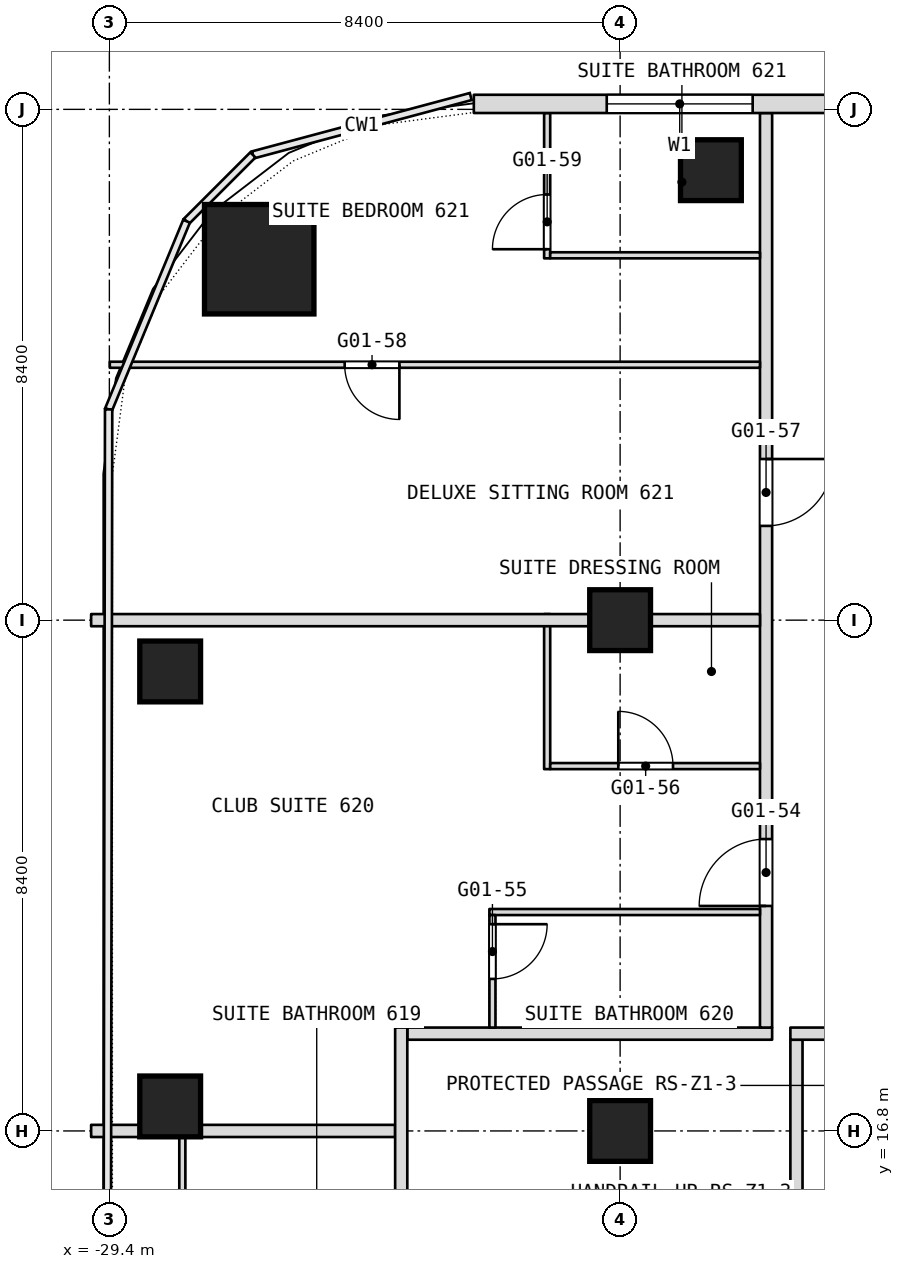
"""IFC4 building model, lengths in metres.
Left out: names, types, materials, properties, quantities, classifications, styles, units other than length and angle.
Written with IfcOpenShell. Run it as: python <this file> out.ifc"""

import sys

from ifc_helpers import new_model, si_unit, direction, frame, frame_2d, origin, origin_2d, place, context, subcontext, project, spatial, rectangle, extrude, element, fill, save


model = new_model("IFC4")
c1 = context("Model", 3, precision=1e-05, world=origin(), true_north=direction((0.0, 1.0)))
c2 = subcontext(c1, "Body", "Model", "MODEL_VIEW")
j1 = project(units=[si_unit("LENGTHUNIT", "METRE"), si_unit("PLANEANGLEUNIT", "RADIAN")], contexts=[c1])
p1 = place(None, origin())
s1 = spatial("IfcSite", under=j1, at=p1, CompositionType="ELEMENT")
p2 = place(p1, origin())
s2 = spatial("IfcBuilding", under=s1, at=p2, CompositionType="ELEMENT")
p3 = place(p2, frame((0.0, 0.0, 36.5)))
s3 = spatial("IfcBuildingStorey", under=s2, at=p3, CompositionType="ELEMENT", Elevation=36.5)
p4 = place(p3, frame((-26.936, 31.135, 0.0), z_axis=(0.0, 0.0, 1.0), x_axis=(1.0, 0.0, 0.0)))
e1 = element("IfcColumn", 1, at=p4, inside=s3, PredefinedType="COLUMN", context=c2, shape_type="SweptSolid", body=[
    extrude(rectangle(XDim=1.8, YDim=1.8, at=origin_2d()), origin(), (0.0, 0.0, 1.0), 3.6),
])
for number, where, z_axis, x_axis in (
    (2, (-21.0, 16.8, 0.0), (0.0, 0.0, 1.0), (1.0, 0.0, 0.0)),
    (3, (-21.0, 25.2, 0.0), (0.0, 0.0, 1.0), (1.0, 0.0, 0.0)),
    (4, (-28.4, 17.203, 0.0), (0.0, 0.0, 1.0), (1.0, 0.0, 0.0)),
    (5, (-28.4, 24.356, 0.0), (0.0, 0.0, 1.0), (1.0, 0.0, 0.0)),
    (6, (-19.507, 32.6, 0.0), (0.0, 0.0, 1.0), (1.0, 0.0, 0.0)),
):
    element("IfcColumn", number, at=place(p3, frame(where, z_axis=z_axis, x_axis=x_axis)), inside=s3, PredefinedType="COLUMN", context=c2, shape_type="SweptSolid", body=[
        extrude(rectangle(XDim=1.0, YDim=1.0, at=origin_2d()), origin(), (0.0, 0.0, 1.0), 3.6),
    ])
p5 = place(p3, frame((-29.7, 16.8, 0.0), z_axis=(0.0, 0.0, 1.0), x_axis=(1.0, 0.0, 0.0)))
e7 = element("IfcWall", 7, at=p5, inside=s3, PredefinedType="PARTITIONING", context=c2, shape_type="SweptSolid", body=[
    extrude(rectangle(XDim=5.0, YDim=0.2, at=frame_2d((2.5, 0.0))), origin(), (0.0, 0.0, 1.0), 2.84),
])
p6 = place(p3, frame((-18.1, 15.8, 0.0), z_axis=(0.0, 0.0, 1.0), x_axis=(0.0, 1.0, 0.0)))
e8 = element("IfcWall", 8, at=p6, inside=s3, PredefinedType="PARTITIONING", context=c2, shape_type="SweptSolid", body=[
    extrude(rectangle(XDim=2.5, YDim=0.2, at=frame_2d((1.25, 0.0))), origin(), (0.0, 0.0, 1.0), 3.34),
])
p7 = place(p3, frame((-24.5, 18.4, 0.0), z_axis=(0.0, 0.0, 1.0), x_axis=(1.0, 0.0, 0.0)))
e9 = element("IfcWall", 9, at=p7, inside=s3, PredefinedType="PARTITIONING", context=c2, shape_type="SweptSolid", body=[
    extrude(rectangle(XDim=6.0, YDim=0.2, at=frame_2d((3.0, 0.0))), origin(), (0.0, 0.0, 1.0), 3.34),
])
p8 = place(p3, frame((-18.2, 18.4, 0.0), z_axis=(0.0, 0.0, 1.0), x_axis=(1.0, 0.0, 0.0)))
e10 = element("IfcWall", 10, at=p8, inside=s3, PredefinedType="PARTITIONING", context=c2, shape_type="SweptSolid", body=[
    extrude(rectangle(XDim=5.0, YDim=0.2, at=frame_2d((2.5, 0.0))), origin(), (0.0, 0.0, 1.0), 3.34),
])
p9 = place(p3, frame((-18.6, 18.5, 0.0), z_axis=(0.0, 0.0, 1.0), x_axis=(0.0, 1.0, 0.0)))
e11 = element("IfcWall", 11, at=p9, inside=s3, PredefinedType="PARTITIONING", context=c2, shape_type="SweptSolid", body=[
    extrude(rectangle(XDim=15.04, YDim=0.2, at=frame_2d((7.52, 0.0))), origin(), (0.0, 0.0, 1.0), 3.34),
])
p10 = place(p9, frame((2.0, 0.0, 0.0)))
e12 = element("IfcOpeningElement", 12, at=p10, cuts=e11, PredefinedType="OPENING", context=c2, shape_type="SweptSolid", body=[
    extrude(rectangle(XDim=1.1, YDim=2.1, at=frame_2d((0.55, 1.05))), frame((0.0, 0.1, 0.0), z_axis=(0.0, -1.0, 0.0), x_axis=(1.0, 0.0, 0.0)), (0.0, 0.0, 1.0), 0.2),
])
p11 = place(p9, frame((8.25, 0.0, 0.0)))
e13 = element("IfcOpeningElement", 13, at=p11, cuts=e11, PredefinedType="OPENING", context=c2, shape_type="SweptSolid", body=[
    extrude(rectangle(XDim=1.1, YDim=2.1, at=frame_2d((0.55, 1.05))), frame((0.0, 0.1, 0.0), z_axis=(0.0, -1.0, 0.0), x_axis=(1.0, 0.0, 0.0)), (0.0, 0.0, 1.0), 0.2),
])
p12 = place(p3, frame((-23.15, 20.4, 0.0), z_axis=(0.0, 0.0, 1.0), x_axis=(1.0, 0.0, 0.0)))
e14 = element("IfcWall", 14, at=p12, inside=s3, PredefinedType="PARTITIONING", context=c2, shape_type="SweptSolid", body=[
    extrude(rectangle(XDim=4.45, YDim=0.1, at=frame_2d((2.225, 0.0))), origin(), (0.0, 0.0, 1.0), 3.34),
])
p13 = place(p3, frame((-22.2, 22.75, 0.0), z_axis=(0.0, 0.0, 1.0), x_axis=(0.0, 1.0, 0.0)))
e15 = element("IfcWall", 15, at=p13, inside=s3, PredefinedType="PARTITIONING", context=c2, shape_type="SweptSolid", body=[
    extrude(rectangle(XDim=2.55, YDim=0.1, at=frame_2d((1.275, 0.0))), origin(), (0.0, 0.0, 1.0), 3.34),
])
p14 = place(p3, frame((-22.2, 31.15, 0.0), z_axis=(0.0, 0.0, 1.0), x_axis=(0.0, 1.0, 0.0)))
e16 = element("IfcWall", 16, at=p14, inside=s3, PredefinedType="PARTITIONING", context=c2, shape_type="SweptSolid", body=[
    extrude(rectangle(XDim=2.39, YDim=0.1, at=frame_2d((1.195, 0.0))), origin(), (0.0, 0.0, 1.0), 3.34),
])
p15 = place(p14, frame((0.15, 0.0, 0.0)))
e17 = element("IfcOpeningElement", 17, at=p15, cuts=e16, PredefinedType="OPENING", context=c2, shape_type="SweptSolid", body=[
    extrude(rectangle(XDim=0.9, YDim=2.1, at=frame_2d((0.45, 1.05))), frame((0.0, 0.05, 0.0), z_axis=(0.0, -1.0, 0.0), x_axis=(1.0, 0.0, 0.0)), (0.0, 0.0, 1.0), 0.1),
])
p16 = place(p3, frame((-22.15, 22.8, 0.0), z_axis=(0.0, 0.0, 1.0), x_axis=(1.0, 0.0, 0.0)))
e18 = element("IfcWall", 18, at=p16, inside=s3, PredefinedType="PARTITIONING", context=c2, shape_type="SweptSolid", body=[
    extrude(rectangle(XDim=3.45, YDim=0.1, at=frame_2d((1.725, 0.0))), origin(), (0.0, 0.0, 1.0), 3.34),
])
p17 = place(p16, frame((1.12, 0.0, 0.0)))
e19 = element("IfcOpeningElement", 19, at=p17, cuts=e18, PredefinedType="OPENING", context=c2, shape_type="SweptSolid", body=[
    extrude(rectangle(XDim=0.9, YDim=2.1, at=frame_2d((0.45, 1.05))), frame((0.0, 0.05, 0.0), z_axis=(0.0, -1.0, 0.0), x_axis=(1.0, 0.0, 0.0)), (0.0, 0.0, 1.0), 0.1),
])
p18 = place(p3, frame((-23.1, 18.5, 0.0), z_axis=(0.0, 0.0, 1.0), x_axis=(0.0, 1.0, 0.0)))
e20 = element("IfcWall", 20, at=p18, inside=s3, PredefinedType="PARTITIONING", context=c2, shape_type="SweptSolid", body=[
    extrude(rectangle(XDim=1.85, YDim=0.1, at=frame_2d((0.925, 0.0))), origin(), (0.0, 0.0, 1.0), 3.34),
])
p19 = place(p18, frame((0.8, 0.0, 0.0)))
e21 = element("IfcOpeningElement", 21, at=p19, cuts=e20, PredefinedType="OPENING", context=c2, shape_type="SweptSolid", body=[
    extrude(rectangle(XDim=0.9, YDim=2.1, at=frame_2d((0.45, 1.05))), frame((0.0, 0.05, 0.0), z_axis=(0.0, -1.0, 0.0), x_axis=(1.0, 0.0, 0.0)), (0.0, 0.0, 1.0), 0.1),
])
p20 = place(p3, frame((-24.6, 6.9, 0.0), z_axis=(0.0, 0.0, 1.0), x_axis=(0.0, 1.0, 0.0)))
e22 = element("IfcWall", 22, at=p20, inside=s3, PredefinedType="PARTITIONING", context=c2, shape_type="SweptSolid", body=[
    extrude(rectangle(XDim=11.6, YDim=0.2, at=frame_2d((5.8, 0.0))), origin(), (0.0, 0.0, 1.0), 3.34),
])
p21 = place(p20, frame((5.1, 0.0, 0.0)))
e23 = element("IfcOpeningElement", 23, at=p21, cuts=e22, PredefinedType="OPENING", context=c2, shape_type="SweptSolid", body=[
    extrude(rectangle(XDim=1.1, YDim=2.1, at=frame_2d((0.55, 1.05))), frame((0.0, 0.1, 0.0), z_axis=(0.0, -1.0, 0.0), x_axis=(1.0, 0.0, 0.0)), (0.0, 0.0, 1.0), 0.2),
])
p22 = place(p3, frame((-29.7, 25.2, 0.0), z_axis=(0.0, 0.0, 1.0), x_axis=(1.0, 0.0, 0.0)))
e24 = element("IfcWall", 24, at=p22, inside=s3, PredefinedType="PARTITIONING", context=c2, shape_type="SweptSolid", body=[
    extrude(rectangle(XDim=11.0, YDim=0.2, at=frame_2d((5.5, 0.0))), origin(), (0.0, 0.0, 1.0), 2.84),
])
p23 = place(p3, frame((-28.2, 13.15, 0.0), z_axis=(0.0, 0.0, 1.0), x_axis=(0.0, 1.0, 0.0)))
e25 = element("IfcWall", 25, at=p23, inside=s3, PredefinedType="PARTITIONING", context=c2, shape_type="SweptSolid", body=[
    extrude(rectangle(XDim=3.75, YDim=0.1, at=frame_2d((1.875, 0.0))), origin(), (0.0, 0.0, 1.0), 2.94),
])
p24 = place(p3, frame((-29.393, 29.4, 0.0), z_axis=(0.0, 0.0, 1.0), x_axis=(1.0, 0.0, 0.0)))
e26 = element("IfcWall", 26, at=p24, inside=s3, PredefinedType="PARTITIONING", context=c2, shape_type="SweptSolid", body=[
    extrude(rectangle(XDim=10.693, YDim=0.1, at=frame_2d((5.347, 0.0))), origin(), (0.0, 0.0, 1.0), 3.34),
])
p25 = place(p24, frame((3.863, 0.0, 0.0)))
e27 = element("IfcOpeningElement", 27, at=p25, cuts=e26, PredefinedType="OPENING", context=c2, shape_type="SweptSolid", body=[
    extrude(rectangle(XDim=0.9, YDim=2.1, at=frame_2d((0.45, 1.05))), frame((0.0, 0.05, 0.0), z_axis=(0.0, -1.0, 0.0), x_axis=(1.0, 0.0, 0.0)), (0.0, 0.0, 1.0), 0.1),
])
p26 = place(p3, frame((-22.15, 31.2, 0.0), z_axis=(0.0, 0.0, 1.0), x_axis=(1.0, 0.0, 0.0)))
e28 = element("IfcWall", 28, at=p26, inside=s3, PredefinedType="PARTITIONING", context=c2, shape_type="SweptSolid", body=[
    extrude(rectangle(XDim=3.45, YDim=0.1, at=frame_2d((1.725, 0.0))), origin(), (0.0, 0.0, 1.0), 3.34),
])
p27 = place(p3, frame((23.406, 33.69, 0.0), z_axis=(0.0, 0.0, 1.0), x_axis=(-1.0, 0.0, 0.0)))
e29 = element("IfcWall", 29, at=p27, inside=s3, PredefinedType="NOTDEFINED", context=c2, shape_type="SweptSolid", body=[
    extrude(rectangle(XDim=46.812, YDim=0.3, at=frame_2d((23.406, 0.0))), origin(), (0.0, 0.0, 1.0), 3.6),
])
p28 = place(p27, frame((2.186, 0.0, 0.9)))
e30 = element("IfcOpeningElement", 30, at=p28, cuts=e29, PredefinedType="OPENING", context=c2, shape_type="SweptSolid", body=[
    extrude(rectangle(XDim=2.4, YDim=2.1, at=frame_2d((1.2, 1.05))), frame((0.0, 0.15, 0.0), z_axis=(0.0, -1.0, 0.0), x_axis=(1.0, 0.0, 0.0)), (0.0, 0.0, 1.0), 0.3),
])
p29 = place(p27, frame((7.506, 0.0, 0.9)))
e31 = element("IfcOpeningElement", 31, at=p29, cuts=e29, PredefinedType="OPENING", context=c2, shape_type="SweptSolid", body=[
    extrude(rectangle(XDim=2.4, YDim=2.1, at=frame_2d((1.2, 1.05))), frame((0.0, 0.15, 0.0), z_axis=(0.0, -1.0, 0.0), x_axis=(1.0, 0.0, 0.0)), (0.0, 0.0, 1.0), 0.3),
])
p30 = place(p27, frame((11.706, 0.0, 0.9)))
e32 = element("IfcOpeningElement", 32, at=p30, cuts=e29, PredefinedType="OPENING", context=c2, shape_type="SweptSolid", body=[
    extrude(rectangle(XDim=2.4, YDim=2.1, at=frame_2d((1.2, 1.05))), frame((0.0, 0.15, 0.0), z_axis=(0.0, -1.0, 0.0), x_axis=(1.0, 0.0, 0.0)), (0.0, 0.0, 1.0), 0.3),
])
p31 = place(p27, frame((15.906, 0.0, 0.9)))
e33 = element("IfcOpeningElement", 33, at=p31, cuts=e29, PredefinedType="OPENING", context=c2, shape_type="SweptSolid", body=[
    extrude(rectangle(XDim=2.4, YDim=2.1, at=frame_2d((1.2, 1.05))), frame((0.0, 0.15, 0.0), z_axis=(0.0, -1.0, 0.0), x_axis=(1.0, 0.0, 0.0)), (0.0, 0.0, 1.0), 0.3),
])
p32 = place(p27, frame((20.106, 0.0, 0.9)))
e34 = element("IfcOpeningElement", 34, at=p32, cuts=e29, PredefinedType="OPENING", context=c2, shape_type="SweptSolid", body=[
    extrude(rectangle(XDim=2.4, YDim=2.1, at=frame_2d((1.2, 1.05))), frame((0.0, 0.15, 0.0), z_axis=(0.0, -1.0, 0.0), x_axis=(1.0, 0.0, 0.0)), (0.0, 0.0, 1.0), 0.3),
])
p33 = place(p27, frame((24.306, 0.0, 0.9)))
e35 = element("IfcOpeningElement", 35, at=p33, cuts=e29, PredefinedType="OPENING", context=c2, shape_type="SweptSolid", body=[
    extrude(rectangle(XDim=2.4, YDim=2.1, at=frame_2d((1.2, 1.05))), frame((0.0, 0.15, 0.0), z_axis=(0.0, -1.0, 0.0), x_axis=(1.0, 0.0, 0.0)), (0.0, 0.0, 1.0), 0.3),
])
p34 = place(p27, frame((28.506, 0.0, 0.9)))
e36 = element("IfcOpeningElement", 36, at=p34, cuts=e29, PredefinedType="OPENING", context=c2, shape_type="SweptSolid", body=[
    extrude(rectangle(XDim=2.4, YDim=2.1, at=frame_2d((1.2, 1.05))), frame((0.0, 0.15, 0.0), z_axis=(0.0, -1.0, 0.0), x_axis=(1.0, 0.0, 0.0)), (0.0, 0.0, 1.0), 0.3),
])
p35 = place(p27, frame((32.706, 0.0, 0.9)))
e37 = element("IfcOpeningElement", 37, at=p35, cuts=e29, PredefinedType="OPENING", context=c2, shape_type="SweptSolid", body=[
    extrude(rectangle(XDim=2.4, YDim=2.1, at=frame_2d((1.2, 1.05))), frame((0.0, 0.15, 0.0), z_axis=(0.0, -1.0, 0.0), x_axis=(1.0, 0.0, 0.0)), (0.0, 0.0, 1.0), 0.3),
])
p36 = place(p27, frame((36.906, 0.0, 0.9)))
e38 = element("IfcOpeningElement", 38, at=p36, cuts=e29, PredefinedType="OPENING", context=c2, shape_type="SweptSolid", body=[
    extrude(rectangle(XDim=2.4, YDim=2.1, at=frame_2d((1.2, 1.05))), frame((0.0, 0.15, 0.0), z_axis=(0.0, -1.0, 0.0), x_axis=(1.0, 0.0, 0.0)), (0.0, 0.0, 1.0), 0.3),
])
p37 = place(p27, frame((42.226, 0.0, 0.9)))
e39 = element("IfcOpeningElement", 39, at=p37, cuts=e29, PredefinedType="OPENING", context=c2, shape_type="SweptSolid", body=[
    extrude(rectangle(XDim=2.4, YDim=2.1, at=frame_2d((1.2, 1.05))), frame((0.0, 0.15, 0.0), z_axis=(0.0, -1.0, 0.0), x_axis=(1.0, 0.0, 0.0)), (0.0, 0.0, 1.0), 0.3),
])
p38 = place(p10, origin())
e40 = element("IfcDoor", 40, at=p38, inside=s3, OperationType="SINGLE_SWING_LEFT", PredefinedType="DOOR", context=c2, shape_type="SweptSolid", body=[
    extrude(rectangle(XDim=1.1, YDim=2.1, at=frame_2d((0.55, 1.05))), frame((0.0, 0.025, 0.0), z_axis=(0.0, -1.0, 0.0), x_axis=(1.0, 0.0, 0.0)), (0.0, 0.0, 1.0), 0.05),
])
fill(e12, e40)
p39 = place(p11, origin())
e41 = element("IfcDoor", 41, at=p39, inside=s3, OperationType="SINGLE_SWING_RIGHT", PredefinedType="DOOR", context=c2, shape_type="SweptSolid", body=[
    extrude(rectangle(XDim=1.1, YDim=2.1, at=frame_2d((0.55, 1.05))), frame((0.0, 0.025, 0.0), z_axis=(0.0, -1.0, 0.0), x_axis=(1.0, 0.0, 0.0)), (0.0, 0.0, 1.0), 0.05),
])
fill(e13, e41)
p40 = place(p15, origin())
e42 = element("IfcDoor", 42, at=p40, inside=s3, OperationType="SINGLE_SWING_RIGHT", PredefinedType="DOOR", context=c2, shape_type="SweptSolid", body=[
    extrude(rectangle(XDim=0.9, YDim=2.1, at=frame_2d((0.45, 1.05))), frame((0.0, 0.025, 0.0), z_axis=(0.0, -1.0, 0.0), x_axis=(1.0, 0.0, 0.0)), (0.0, 0.0, 1.0), 0.05),
])
fill(e17, e42)
p41 = place(p17, origin())
e43 = element("IfcDoor", 43, at=p41, inside=s3, OperationType="SINGLE_SWING_LEFT", PredefinedType="DOOR", context=c2, shape_type="SweptSolid", body=[
    extrude(rectangle(XDim=0.9, YDim=2.1, at=frame_2d((0.45, 1.05))), frame((0.0, 0.025, 0.0), z_axis=(0.0, -1.0, 0.0), x_axis=(1.0, 0.0, 0.0)), (0.0, 0.0, 1.0), 0.05),
])
fill(e19, e43)
p42 = place(p19, origin())
e44 = element("IfcDoor", 44, at=p42, inside=s3, OperationType="SINGLE_SWING_LEFT", PredefinedType="DOOR", context=c2, shape_type="SweptSolid", body=[
    extrude(rectangle(XDim=0.9, YDim=2.1, at=frame_2d((0.45, 1.05))), frame((0.0, 0.025, 0.0), z_axis=(0.0, -1.0, 0.0), x_axis=(1.0, 0.0, 0.0)), (0.0, 0.0, 1.0), 0.05),
])
fill(e21, e44)
p43 = place(p25, origin())
e45 = element("IfcDoor", 45, at=p43, inside=s3, OperationType="SINGLE_SWING_LEFT", PredefinedType="DOOR", context=c2, shape_type="SweptSolid", body=[
    extrude(rectangle(XDim=0.9, YDim=2.1, at=frame_2d((0.45, 1.05))), frame((0.0, 0.025, 0.0), z_axis=(0.0, -1.0, 0.0), x_axis=(1.0, 0.0, 0.0)), (0.0, 0.0, 1.0), 0.05),
])
fill(e27, e45)
p44 = place(p37, origin())
e46 = element("IfcWindow", 46, at=p44, inside=s3, PartitioningType="SINGLE_PANEL", PredefinedType="WINDOW", context=c2, shape_type="SweptSolid", body=[
    extrude(rectangle(XDim=2.4, YDim=2.1, at=frame_2d((1.2, 1.05))), frame((0.0, 0.03, 0.0), z_axis=(0.0, -1.0, 0.0), x_axis=(1.0, 0.0, 0.0)), (0.0, 0.0, 1.0), 0.06),
])
fill(e39, e46)
save(model, sys.argv[1])
